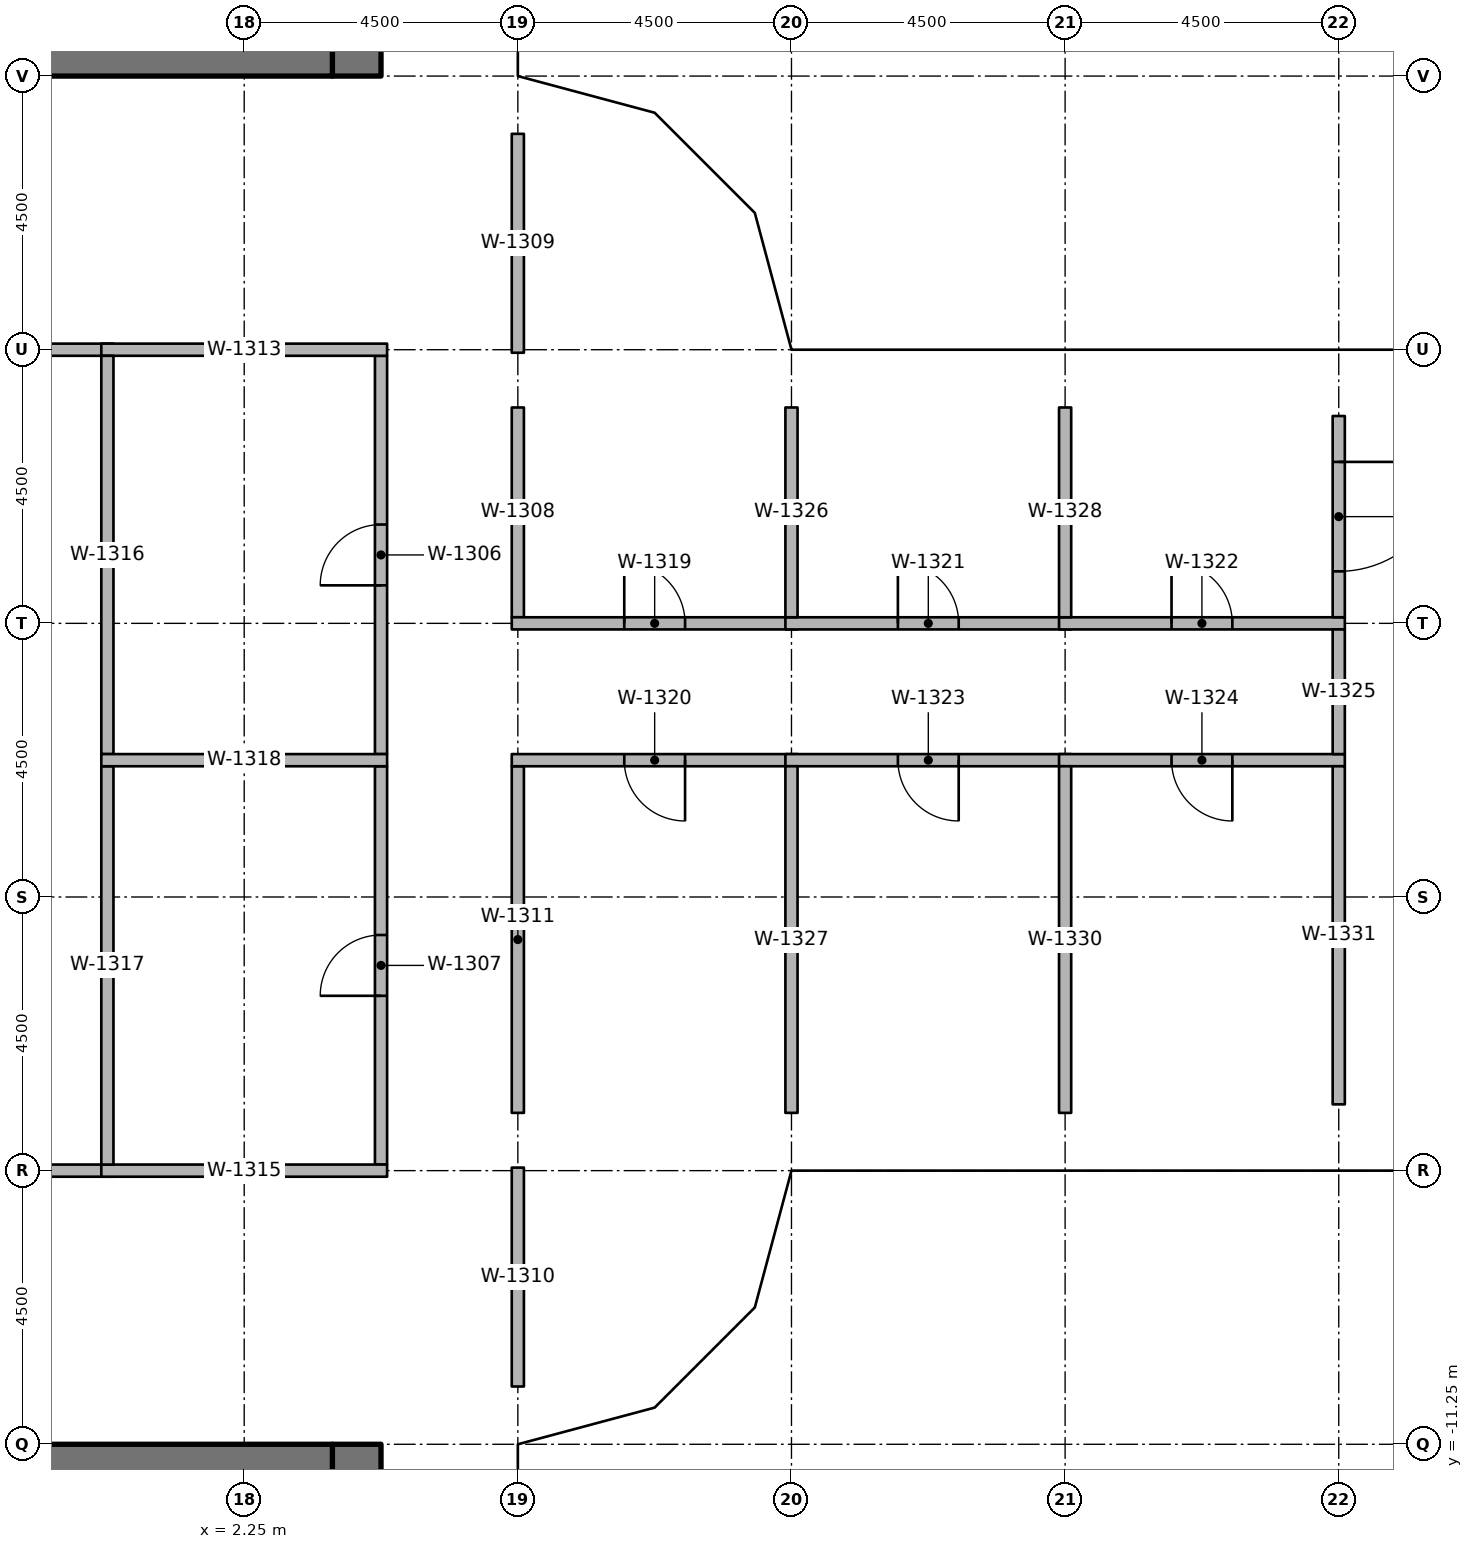
"""IFC4 building model, lengths in metres.
Left out: names, types, materials, properties, quantities, classifications, styles, units other than length and angle.
Written with IfcOpenShell. Run it as: python <this file> out.ifc"""

import sys

from ifc_helpers import new_model, si_unit, direction, frame, frame_2d, origin, origin_2d, place, context, subcontext, project, spatial, rectangle, extrude, element, fill, save


model = new_model("IFC4")
c1 = context("Model", 3, precision=1e-05, world=origin(), true_north=direction((0.0, 1.0)))
c2 = subcontext(c1, "Body", "Model", "MODEL_VIEW")
j1 = project(units=[si_unit("LENGTHUNIT", "METRE"), si_unit("PLANEANGLEUNIT", "RADIAN")], contexts=[c1])
p1 = place(None, origin())
s1 = spatial("IfcSite", under=j1, at=p1, CompositionType="ELEMENT")
p2 = place(p1, origin())
s2 = spatial("IfcBuilding", under=s1, at=p2, CompositionType="ELEMENT")
p3 = place(p2, frame((0.0, 0.0, 132.2)))
s3 = spatial("IfcBuildingStorey", under=s2, at=p3, CompositionType="ELEMENT", Elevation=132.2)
for number, where, z_axis, x_axis in (
    (1, (6.25, -10.75, 0.0), (0.0, 0.0, 1.0), (1.0, 0.0, 0.0)),
    (2, (6.25, -6.25, 0.0), (0.0, 0.0, 1.0), (1.0, 0.0, 0.0)),
    (3, (6.25, 6.25, 0.0), (0.0, 0.0, 1.0), (1.0, 0.0, 0.0)),
    (4, (6.25, 10.75, 0.0), (0.0, 0.0, 1.0), (1.0, 0.0, 0.0)),
    (5, (10.75, -6.25, 0.0), (0.0, 0.0, 1.0), (1.0, 0.0, 0.0)),
    (6, (10.75, 6.25, 0.0), (0.0, 0.0, 1.0), (1.0, 0.0, 0.0)),
    (7, (15.75, -6.25, 0.0), (0.0, 0.0, 1.0), (1.0, 0.0, 0.0)),
    (8, (15.75, 6.25, 0.0), (0.0, 0.0, 1.0), (1.0, 0.0, 0.0)),
    (9, (20.25, -6.11, 0.0), (0.0, 0.0, 1.0), (1.0, 0.0, 0.0)),
    (10, (20.25, 6.11, 0.0), (0.0, 0.0, 1.0), (1.0, 0.0, 0.0)),
):
    element("IfcColumn", number, at=place(p3, frame(where, z_axis=z_axis, x_axis=x_axis)), inside=s3, PredefinedType="COLUMN", context=c2, shape_type="SweptSolid", body=[
        extrude(rectangle(XDim=0.9, YDim=0.9, at=origin_2d()), origin(), (0.0, 0.0, 1.0), 3.65),
    ])
p4 = place(p3, frame((4.1, 11.25, 0.0), z_axis=(0.0, 0.0, 1.0), x_axis=(0.0, 1.0, 0.0)))
e11 = element("IfcWall", 11, at=p4, inside=s3, PredefinedType="SHEAR", context=c2, shape_type="SweptSolid", body=[
    extrude(rectangle(XDim=15.0, YDim=0.8, at=frame_2d((7.5, 0.0))), origin(), (0.0, 0.0, 1.0), 3.8),
])
p5 = place(p4, frame((7.15, 0.0, 0.0)))
e12 = element("IfcOpeningElement", 12, at=p5, cuts=e11, PredefinedType="OPENING", context=c2, shape_type="SweptSolid", body=[
    extrude(rectangle(XDim=1.5, YDim=2.3, at=frame_2d((0.75, 1.15))), frame((0.0, 0.41, 0.0), z_axis=(0.0, -1.0, 0.0), x_axis=(1.0, 0.0, 0.0)), (0.0, 0.0, 1.0), 0.82),
])
p6 = place(p4, frame((5.55, 0.0, 0.0)))
e13 = element("IfcOpeningElement", 13, at=p6, cuts=e11, PredefinedType="OPENING", context=c2, shape_type="SweptSolid", body=[
    extrude(rectangle(XDim=1.2, YDim=2.1, at=frame_2d((0.6, 1.05))), frame((0.0, 0.41, 0.0), z_axis=(0.0, -1.0, 0.0), x_axis=(1.0, 0.0, 0.0)), (0.0, 0.0, 1.0), 0.82),
])
p7 = place(p3, frame((-3.7, 11.65, 0.0), z_axis=(0.0, 0.0, 1.0), x_axis=(1.0, 0.0, 0.0)))
e14 = element("IfcWall", 14, at=p7, inside=s3, PredefinedType="SHEAR", context=c2, shape_type="SweptSolid", body=[
    extrude(rectangle(XDim=7.4, YDim=0.8, at=frame_2d((3.7, 0.0))), origin(), (0.0, 0.0, 1.0), 3.8),
])
p8 = place(p3, frame((4.1, -11.25, 0.0), z_axis=(0.0, 0.0, 1.0), x_axis=(0.0, -1.0, 0.0)))
e15 = element("IfcWall", 15, at=p8, inside=s3, PredefinedType="SHEAR", context=c2, shape_type="SweptSolid", body=[
    extrude(rectangle(XDim=15.0, YDim=0.8, at=frame_2d((7.5, 0.0))), origin(), (0.0, 0.0, 1.0), 3.8),
])
p9 = place(p8, frame((7.15, 0.0, 0.0)))
e16 = element("IfcOpeningElement", 16, at=p9, cuts=e15, PredefinedType="OPENING", context=c2, shape_type="SweptSolid", body=[
    extrude(rectangle(XDim=1.5, YDim=2.3, at=frame_2d((0.75, 1.15))), frame((0.0, 0.41, 0.0), z_axis=(0.0, -1.0, 0.0), x_axis=(1.0, 0.0, 0.0)), (0.0, 0.0, 1.0), 0.82),
])
p10 = place(p8, frame((13.9, 0.0, 0.0)))
e17 = element("IfcOpeningElement", 17, at=p10, cuts=e15, PredefinedType="OPENING", context=c2, shape_type="SweptSolid", body=[
    extrude(rectangle(XDim=0.9, YDim=2.1, at=frame_2d((0.45, 1.05))), frame((0.0, 0.41, 0.0), z_axis=(0.0, -1.0, 0.0), x_axis=(1.0, 0.0, 0.0)), (0.0, 0.0, 1.0), 0.82),
])
p11 = place(p8, frame((1.15, 0.0, 0.0)))
e18 = element("IfcOpeningElement", 18, at=p11, cuts=e15, PredefinedType="OPENING", context=c2, shape_type="SweptSolid", body=[
    extrude(rectangle(XDim=1.2, YDim=2.1, at=frame_2d((0.6, 1.05))), frame((0.0, 0.41, 0.0), z_axis=(0.0, -1.0, 0.0), x_axis=(1.0, 0.0, 0.0)), (0.0, 0.0, 1.0), 0.82),
])
p12 = place(p3, frame((-3.7, -11.65, 0.0), z_axis=(0.0, 0.0, 1.0), x_axis=(1.0, 0.0, 0.0)))
e19 = element("IfcWall", 19, at=p12, inside=s3, PredefinedType="SHEAR", context=c2, shape_type="SweptSolid", body=[
    extrude(rectangle(XDim=7.4, YDim=0.8, at=frame_2d((3.7, 0.0))), origin(), (0.0, 0.0, 1.0), 3.8),
])
p13 = place(p3, frame((4.5, 0.1, 0.0), z_axis=(0.0, 0.0, 1.0), x_axis=(0.0, 1.0, 0.0)))
e20 = element("IfcWall", 20, at=p13, inside=s3, PredefinedType="PARTITIONING", context=c2, shape_type="SweptSolid", body=[
    extrude(rectangle(XDim=6.55, YDim=0.2, at=frame_2d((3.275, 0.0))), origin(), (0.0, 0.0, 1.0), 2.738),
])
p14 = place(p13, frame((2.775, 0.0, 0.0)))
e21 = element("IfcOpeningElement", 21, at=p14, cuts=e20, PredefinedType="OPENING", context=c2, shape_type="SweptSolid", body=[
    extrude(rectangle(XDim=1.0, YDim=2.1, at=frame_2d((0.5, 1.05))), frame((0.0, 0.11, 0.0), z_axis=(0.0, -1.0, 0.0), x_axis=(1.0, 0.0, 0.0)), (0.0, 0.0, 1.0), 0.22),
])
p15 = place(p3, frame((4.5, -6.65, 0.0), z_axis=(0.0, 0.0, 1.0), x_axis=(0.0, 1.0, 0.0)))
e22 = element("IfcWall", 22, at=p15, inside=s3, PredefinedType="PARTITIONING", context=c2, shape_type="SweptSolid", body=[
    extrude(rectangle(XDim=6.55, YDim=0.2, at=frame_2d((3.275, 0.0))), origin(), (0.0, 0.0, 1.0), 2.738),
])
p16 = place(p15, frame((2.775, 0.0, 0.0)))
e23 = element("IfcOpeningElement", 23, at=p16, cuts=e22, PredefinedType="OPENING", context=c2, shape_type="SweptSolid", body=[
    extrude(rectangle(XDim=1.0, YDim=2.1, at=frame_2d((0.5, 1.05))), frame((0.0, 0.11, 0.0), z_axis=(0.0, -1.0, 0.0), x_axis=(1.0, 0.0, 0.0)), (0.0, 0.0, 1.0), 0.22),
])
p17 = place(p3, frame((6.75, 2.35, 0.0), z_axis=(0.0, 0.0, 1.0), x_axis=(0.0, 1.0, 0.0)))
e24 = element("IfcWall", 24, at=p17, inside=s3, PredefinedType="PARTITIONING", context=c2, shape_type="SweptSolid", body=[
    extrude(rectangle(XDim=3.45, YDim=0.2, at=frame_2d((1.725, 0.0))), origin(), (0.0, 0.0, 1.0), 2.738),
])
for number, where, z_axis, x_axis in (
    (25, (6.75, 6.7, 0.0), (0.0, 0.0, 1.0), (0.0, 1.0, 0.0)),
    (26, (6.75, -10.3, 0.0), (0.0, 0.0, 1.0), (0.0, 1.0, 0.0)),
):
    element("IfcWall", number, at=place(p3, frame(where, z_axis=z_axis, x_axis=x_axis)), inside=s3, PredefinedType="PARTITIONING", context=c2, shape_type="SweptSolid", body=[
        extrude(rectangle(XDim=3.6, YDim=0.2, at=frame_2d((1.8, 0.0))), origin(), (0.0, 0.0, 1.0), 2.738),
    ])
p18 = place(p3, frame((6.75, -5.8, 0.0), z_axis=(0.0, 0.0, 1.0), x_axis=(0.0, 1.0, 0.0)))
e27 = element("IfcWall", 27, at=p18, inside=s3, PredefinedType="PARTITIONING", context=c2, shape_type="SweptSolid", body=[
    extrude(rectangle(XDim=5.7, YDim=0.2, at=frame_2d((2.85, 0.0))), origin(), (0.0, 0.0, 1.0), 2.738),
])
for number, where, z_axis, x_axis in (
    (28, (-4.6, 6.75, 0.0), (0.0, 0.0, 1.0), (1.0, 0.0, 0.0)),
    (29, (-0.1, 6.75, 0.0), (0.0, 0.0, 1.0), (1.0, 0.0, 0.0)),
    (30, (-4.6, -6.75, 0.0), (0.0, 0.0, 1.0), (1.0, 0.0, 0.0)),
    (31, (-0.1, -6.75, 0.0), (0.0, 0.0, 1.0), (1.0, 0.0, 0.0)),
):
    element("IfcWall", number, at=place(p3, frame(where, z_axis=z_axis, x_axis=x_axis)), inside=s3, PredefinedType="PARTITIONING", context=c2, shape_type="SweptSolid", body=[
        extrude(rectangle(XDim=4.7, YDim=0.2, at=frame_2d((2.35, 0.0))), origin(), (0.0, 0.0, 1.0), 2.738),
    ])
for number, where, z_axis, x_axis in (
    (32, (0.0, 0.1, 0.0), (0.0, 0.0, 1.0), (0.0, 1.0, 0.0)),
    (33, (0.0, -6.65, 0.0), (0.0, 0.0, 1.0), (0.0, 1.0, 0.0)),
):
    element("IfcWall", number, at=place(p3, frame(where, z_axis=z_axis, x_axis=x_axis)), inside=s3, PredefinedType="PARTITIONING", context=c2, shape_type="SweptSolid", body=[
        extrude(rectangle(XDim=6.55, YDim=0.2, at=frame_2d((3.275, 0.0))), origin(), (0.0, 0.0, 1.0), 2.738),
    ])
p19 = place(p3, frame((-0.1, 0.0, 0.0), z_axis=(0.0, 0.0, 1.0), x_axis=(1.0, 0.0, 0.0)))
e34 = element("IfcWall", 34, at=p19, inside=s3, PredefinedType="PARTITIONING", context=c2, shape_type="SweptSolid", body=[
    extrude(rectangle(XDim=4.7, YDim=0.2, at=frame_2d((2.35, 0.0))), origin(), (0.0, 0.0, 1.0), 2.738),
])
p20 = place(p3, frame((6.65, 2.25, 0.0), z_axis=(0.0, 0.0, 1.0), x_axis=(1.0, 0.0, 0.0)))
e35 = element("IfcWall", 35, at=p20, inside=s3, PredefinedType="PARTITIONING", context=c2, shape_type="SweptSolid", body=[
    extrude(rectangle(XDim=4.7, YDim=0.2, at=frame_2d((2.35, 0.0))), origin(), (0.0, 0.0, 1.0), 2.738),
])
p21 = place(p20, frame((1.85, 0.0, 0.0)))
e36 = element("IfcOpeningElement", 36, at=p21, cuts=e35, PredefinedType="OPENING", context=c2, shape_type="SweptSolid", body=[
    extrude(rectangle(XDim=1.0, YDim=2.1, at=frame_2d((0.5, 1.05))), frame((0.0, 0.11, 0.0), z_axis=(0.0, -1.0, 0.0), x_axis=(1.0, 0.0, 0.0)), (0.0, 0.0, 1.0), 0.22),
])
p22 = place(p3, frame((11.35, 0.0, 0.0), z_axis=(0.0, 0.0, 1.0), x_axis=(-1.0, 0.0, 0.0)))
e37 = element("IfcWall", 37, at=p22, inside=s3, PredefinedType="PARTITIONING", context=c2, shape_type="SweptSolid", body=[
    extrude(rectangle(XDim=4.7, YDim=0.2, at=frame_2d((2.35, 0.0))), origin(), (0.0, 0.0, 1.0), 2.738),
])
p23 = place(p22, frame((1.85, 0.0, 0.0)))
e38 = element("IfcOpeningElement", 38, at=p23, cuts=e37, PredefinedType="OPENING", context=c2, shape_type="SweptSolid", body=[
    extrude(rectangle(XDim=1.0, YDim=2.1, at=frame_2d((0.5, 1.05))), frame((0.0, 0.11, 0.0), z_axis=(0.0, -1.0, 0.0), x_axis=(1.0, 0.0, 0.0)), (0.0, 0.0, 1.0), 0.22),
])
p24 = place(p3, frame((11.15, 2.25, 0.0), z_axis=(0.0, 0.0, 1.0), x_axis=(1.0, 0.0, 0.0)))
e39 = element("IfcWall", 39, at=p24, inside=s3, PredefinedType="PARTITIONING", context=c2, shape_type="SweptSolid", body=[
    extrude(rectangle(XDim=4.7, YDim=0.2, at=frame_2d((2.35, 0.0))), origin(), (0.0, 0.0, 1.0), 2.738),
])
p25 = place(p24, frame((1.85, 0.0, 0.0)))
e40 = element("IfcOpeningElement", 40, at=p25, cuts=e39, PredefinedType="OPENING", context=c2, shape_type="SweptSolid", body=[
    extrude(rectangle(XDim=1.0, YDim=2.1, at=frame_2d((0.5, 1.05))), frame((0.0, 0.11, 0.0), z_axis=(0.0, -1.0, 0.0), x_axis=(1.0, 0.0, 0.0)), (0.0, 0.0, 1.0), 0.22),
])
p26 = place(p3, frame((15.65, 2.25, 0.0), z_axis=(0.0, 0.0, 1.0), x_axis=(1.0, 0.0, 0.0)))
e41 = element("IfcWall", 41, at=p26, inside=s3, PredefinedType="PARTITIONING", context=c2, shape_type="SweptSolid", body=[
    extrude(rectangle(XDim=4.7, YDim=0.2, at=frame_2d((2.35, 0.0))), origin(), (0.0, 0.0, 1.0), 2.738),
])
p27 = place(p26, frame((1.85, 0.0, 0.0)))
e42 = element("IfcOpeningElement", 42, at=p27, cuts=e41, PredefinedType="OPENING", context=c2, shape_type="SweptSolid", body=[
    extrude(rectangle(XDim=1.0, YDim=2.1, at=frame_2d((0.5, 1.05))), frame((0.0, 0.11, 0.0), z_axis=(0.0, -1.0, 0.0), x_axis=(1.0, 0.0, 0.0)), (0.0, 0.0, 1.0), 0.22),
])
p28 = place(p3, frame((15.85, 0.0, 0.0), z_axis=(0.0, 0.0, 1.0), x_axis=(-1.0, 0.0, 0.0)))
e43 = element("IfcWall", 43, at=p28, inside=s3, PredefinedType="PARTITIONING", context=c2, shape_type="SweptSolid", body=[
    extrude(rectangle(XDim=4.7, YDim=0.2, at=frame_2d((2.35, 0.0))), origin(), (0.0, 0.0, 1.0), 2.738),
])
p29 = place(p28, frame((1.85, 0.0, 0.0)))
e44 = element("IfcOpeningElement", 44, at=p29, cuts=e43, PredefinedType="OPENING", context=c2, shape_type="SweptSolid", body=[
    extrude(rectangle(XDim=1.0, YDim=2.1, at=frame_2d((0.5, 1.05))), frame((0.0, 0.11, 0.0), z_axis=(0.0, -1.0, 0.0), x_axis=(1.0, 0.0, 0.0)), (0.0, 0.0, 1.0), 0.22),
])
p30 = place(p3, frame((20.35, 0.0, 0.0), z_axis=(0.0, 0.0, 1.0), x_axis=(-1.0, 0.0, 0.0)))
e45 = element("IfcWall", 45, at=p30, inside=s3, PredefinedType="PARTITIONING", context=c2, shape_type="SweptSolid", body=[
    extrude(rectangle(XDim=4.7, YDim=0.2, at=frame_2d((2.35, 0.0))), origin(), (0.0, 0.0, 1.0), 2.738),
])
p31 = place(p30, frame((1.85, 0.0, 0.0)))
e46 = element("IfcOpeningElement", 46, at=p31, cuts=e45, PredefinedType="OPENING", context=c2, shape_type="SweptSolid", body=[
    extrude(rectangle(XDim=1.0, YDim=2.1, at=frame_2d((0.5, 1.05))), frame((0.0, 0.11, 0.0), z_axis=(0.0, -1.0, 0.0), x_axis=(1.0, 0.0, 0.0)), (0.0, 0.0, 1.0), 0.22),
])
p32 = place(p3, frame((20.25, 0.1, 0.0), z_axis=(0.0, 0.0, 1.0), x_axis=(0.0, 1.0, 0.0)))
e47 = element("IfcWall", 47, at=p32, inside=s3, PredefinedType="PARTITIONING", context=c2, shape_type="SweptSolid", body=[
    extrude(rectangle(XDim=2.05, YDim=0.2, at=frame_2d((1.025, 0.0))), origin(), (0.0, 0.0, 1.0), 2.738),
])
p33 = place(p3, frame((11.25, 2.35, 0.0), z_axis=(0.0, 0.0, 1.0), x_axis=(0.0, 1.0, 0.0)))
e48 = element("IfcWall", 48, at=p33, inside=s3, PredefinedType="PARTITIONING", context=c2, shape_type="SweptSolid", body=[
    extrude(rectangle(XDim=3.45, YDim=0.2, at=frame_2d((1.725, 0.0))), origin(), (0.0, 0.0, 1.0), 2.738),
])
p34 = place(p3, frame((11.25, -5.8, 0.0), z_axis=(0.0, 0.0, 1.0), x_axis=(0.0, 1.0, 0.0)))
e49 = element("IfcWall", 49, at=p34, inside=s3, PredefinedType="PARTITIONING", context=c2, shape_type="SweptSolid", body=[
    extrude(rectangle(XDim=5.7, YDim=0.2, at=frame_2d((2.85, 0.0))), origin(), (0.0, 0.0, 1.0), 2.738),
])
p35 = place(p3, frame((15.75, 2.35, 0.0), z_axis=(0.0, 0.0, 1.0), x_axis=(0.0, 1.0, 0.0)))
e50 = element("IfcWall", 50, at=p35, inside=s3, PredefinedType="PARTITIONING", context=c2, shape_type="SweptSolid", body=[
    extrude(rectangle(XDim=3.45, YDim=0.2, at=frame_2d((1.725, 0.0))), origin(), (0.0, 0.0, 1.0), 2.738),
])
p36 = place(p3, frame((20.25, 5.66, 0.0), z_axis=(0.0, 0.0, 1.0), x_axis=(0.0, -1.0, 0.0)))
e51 = element("IfcWall", 51, at=p36, inside=s3, PredefinedType="PARTITIONING", context=c2, shape_type="SweptSolid", body=[
    extrude(rectangle(XDim=3.31, YDim=0.2, at=frame_2d((1.655, 0.0))), origin(), (0.0, 0.0, 1.0), 2.738),
])
p37 = place(p36, frame((0.755, 0.0, 0.0)))
e52 = element("IfcOpeningElement", 52, at=p37, cuts=e51, PredefinedType="OPENING", context=c2, shape_type="SweptSolid", body=[
    extrude(rectangle(XDim=1.8, YDim=2.1, at=frame_2d((0.9, 1.05))), frame((0.0, 0.11, 0.0), z_axis=(0.0, -1.0, 0.0), x_axis=(1.0, 0.0, 0.0)), (0.0, 0.0, 1.0), 0.22),
])
p38 = place(p3, frame((15.75, -5.8, 0.0), z_axis=(0.0, 0.0, 1.0), x_axis=(0.0, 1.0, 0.0)))
e53 = element("IfcWall", 53, at=p38, inside=s3, PredefinedType="PARTITIONING", context=c2, shape_type="SweptSolid", body=[
    extrude(rectangle(XDim=5.7, YDim=0.2, at=frame_2d((2.85, 0.0))), origin(), (0.0, 0.0, 1.0), 2.738),
])
p39 = place(p3, frame((20.25, -5.66, 0.0), z_axis=(0.0, 0.0, 1.0), x_axis=(0.0, 1.0, 0.0)))
e54 = element("IfcWall", 54, at=p39, inside=s3, PredefinedType="PARTITIONING", context=c2, shape_type="SweptSolid", body=[
    extrude(rectangle(XDim=5.56, YDim=0.2, at=frame_2d((2.78, 0.0))), origin(), (0.0, 0.0, 1.0), 2.738),
])
p40 = place(p14, origin())
e55 = element("IfcDoor", 55, at=p40, inside=s3, OperationType="SINGLE_SWING_LEFT", PredefinedType="DOOR", context=c2, shape_type="SweptSolid", body=[
    extrude(rectangle(XDim=1.0, YDim=2.1, at=frame_2d((0.5, 1.05))), frame((0.0, 0.025, 0.0), z_axis=(0.0, -1.0, 0.0), x_axis=(1.0, 0.0, 0.0)), (0.0, 0.0, 1.0), 0.05),
])
fill(e21, e55)
p41 = place(p16, origin())
e56 = element("IfcDoor", 56, at=p41, inside=s3, OperationType="SINGLE_SWING_RIGHT", PredefinedType="DOOR", context=c2, shape_type="SweptSolid", body=[
    extrude(rectangle(XDim=1.0, YDim=2.1, at=frame_2d((0.5, 1.05))), frame((0.0, 0.025, 0.0), z_axis=(0.0, -1.0, 0.0), x_axis=(1.0, 0.0, 0.0)), (0.0, 0.0, 1.0), 0.05),
])
fill(e23, e56)
p42 = place(p37, origin())
e57 = element("IfcDoor", 57, at=p42, inside=s3, OperationType="DOUBLE_DOOR_SINGLE_SWING", PredefinedType="DOOR", context=c2, shape_type="SweptSolid", body=[
    extrude(rectangle(XDim=1.8, YDim=2.1, at=frame_2d((0.9, 1.05))), frame((0.0, 0.025, 0.0), z_axis=(0.0, -1.0, 0.0), x_axis=(1.0, 0.0, 0.0)), (0.0, 0.0, 1.0), 0.05),
])
fill(e52, e57)
p43 = place(p21, origin())
e58 = element("IfcDoor", 58, at=p43, inside=s3, OperationType="SINGLE_SWING_RIGHT", PredefinedType="DOOR", context=c2, shape_type="SweptSolid", body=[
    extrude(rectangle(XDim=1.0, YDim=2.1, at=frame_2d((0.5, 1.05))), frame((0.0, 0.025, 0.0), z_axis=(0.0, -1.0, 0.0), x_axis=(1.0, 0.0, 0.0)), (0.0, 0.0, 1.0), 0.05),
])
fill(e36, e58)
p44 = place(p25, origin())
e59 = element("IfcDoor", 59, at=p44, inside=s3, OperationType="SINGLE_SWING_RIGHT", PredefinedType="DOOR", context=c2, shape_type="SweptSolid", body=[
    extrude(rectangle(XDim=1.0, YDim=2.1, at=frame_2d((0.5, 1.05))), frame((0.0, 0.025, 0.0), z_axis=(0.0, -1.0, 0.0), x_axis=(1.0, 0.0, 0.0)), (0.0, 0.0, 1.0), 0.05),
])
fill(e40, e59)
p45 = place(p27, origin())
e60 = element("IfcDoor", 60, at=p45, inside=s3, OperationType="SINGLE_SWING_LEFT", PredefinedType="DOOR", context=c2, shape_type="SweptSolid", body=[
    extrude(rectangle(XDim=1.0, YDim=2.1, at=frame_2d((0.5, 1.05))), frame((0.0, 0.025, 0.0), z_axis=(0.0, -1.0, 0.0), x_axis=(1.0, 0.0, 0.0)), (0.0, 0.0, 1.0), 0.05),
])
fill(e42, e60)
p46 = place(p23, origin())
e61 = element("IfcDoor", 61, at=p46, inside=s3, OperationType="SINGLE_SWING_RIGHT", PredefinedType="DOOR", context=c2, shape_type="SweptSolid", body=[
    extrude(rectangle(XDim=1.0, YDim=2.1, at=frame_2d((0.5, 1.05))), frame((0.0, 0.025, 0.0), z_axis=(0.0, -1.0, 0.0), x_axis=(1.0, 0.0, 0.0)), (0.0, 0.0, 1.0), 0.05),
])
fill(e38, e61)
p47 = place(p29, origin())
e62 = element("IfcDoor", 62, at=p47, inside=s3, OperationType="SINGLE_SWING_RIGHT", PredefinedType="DOOR", context=c2, shape_type="SweptSolid", body=[
    extrude(rectangle(XDim=1.0, YDim=2.1, at=frame_2d((0.5, 1.05))), frame((0.0, 0.025, 0.0), z_axis=(0.0, -1.0, 0.0), x_axis=(1.0, 0.0, 0.0)), (0.0, 0.0, 1.0), 0.05),
])
fill(e44, e62)
p48 = place(p31, origin())
e63 = element("IfcDoor", 63, at=p48, inside=s3, OperationType="SINGLE_SWING_RIGHT", PredefinedType="DOOR", context=c2, shape_type="SweptSolid", body=[
    extrude(rectangle(XDim=1.0, YDim=2.1, at=frame_2d((0.5, 1.05))), frame((0.0, 0.025, 0.0), z_axis=(0.0, -1.0, 0.0), x_axis=(1.0, 0.0, 0.0)), (0.0, 0.0, 1.0), 0.05),
])
fill(e46, e63)
save(model, sys.argv[1])
